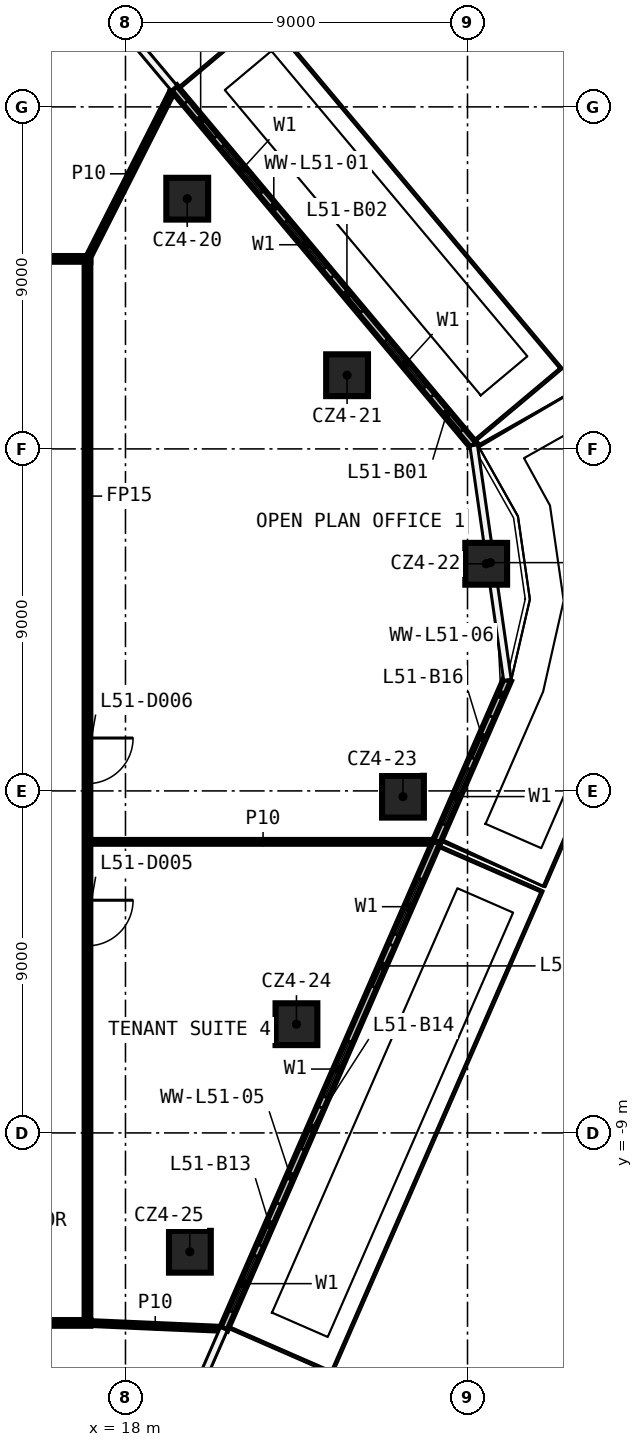
"""IFC4 building model, lengths in metres.
Left out: names, types, materials, properties, quantities, classifications, styles, units other than length and angle.
Written with IfcOpenShell. Run it as: python <this file> out.ifc"""

import sys

from ifc_helpers import new_model, si_unit, direction, frame, frame_2d, origin, origin_2d, place, context, subcontext, project, spatial, rectangle, extrude, element, fill, save


model = new_model("IFC4")
c1 = context("Model", 3, precision=1e-05, world=origin(), true_north=direction((0.0, 1.0)))
c2 = subcontext(c1, "Body", "Model", "MODEL_VIEW")
j1 = project(units=[si_unit("LENGTHUNIT", "METRE"), si_unit("PLANEANGLEUNIT", "RADIAN")], contexts=[c1])
p1 = place(None, origin())
s1 = spatial("IfcSite", under=j1, at=p1, CompositionType="ELEMENT")
p2 = place(p1, origin())
s2 = spatial("IfcBuilding", under=s1, at=p2, CompositionType="ELEMENT")
p3 = place(p2, frame((0.0, 0.0, 245.4)))
s3 = spatial("IfcBuildingStorey", under=s2, at=p3, CompositionType="ELEMENT", Elevation=245.4)
for number, where, z_axis, x_axis in (
    (1, (19.625, 15.584, 0.0), (0.0, 0.0, 1.0), (1.0, 0.0, 0.0)),
    (2, (23.831, 10.939, 0.0), (0.0, 0.0, 1.0), (1.0, 0.0, 0.0)),
    (3, (27.492, 5.977, 0.0), (0.0, 0.0, 1.0), (1.0, 0.0, 0.0)),
    (4, (25.302, -0.152, 0.0), (0.0, 0.0, 1.0), (1.0, 0.0, 0.0)),
    (5, (22.499, -6.139, 0.0), (0.0, 0.0, 1.0), (1.0, 0.0, 0.0)),
    (6, (19.695, -12.127, 0.0), (0.0, 0.0, 1.0), (1.0, 0.0, 0.0)),
):
    element("IfcColumn", number, at=place(p3, frame(where, z_axis=z_axis, x_axis=x_axis)), inside=s3, PredefinedType="COLUMN", context=c2, shape_type="SweptSolid", body=[
        extrude(rectangle(XDim=1.1, YDim=1.1, at=origin_2d()), origin(), (0.0, 0.0, 1.0), 3.82),
    ])
p4 = place(p3, frame((17.075, -14.0, 0.0), z_axis=(0.0, 0.0, 1.0), x_axis=(-1.0, 0.0, 0.0)))
e7 = element("IfcWall", 7, at=p4, inside=s3, PredefinedType="PARTITIONING", context=c2, shape_type="SweptSolid", body=[
    extrude(rectangle(XDim=26.15, YDim=0.15, at=frame_2d((13.075, 0.0))), origin(), (0.0, 0.0, 1.0), 3.82),
])
p5 = place(p4, frame((23.476, 0.0, 0.0)))
e8 = element("IfcOpeningElement", 8, at=p5, cuts=e7, PredefinedType="OPENING", context=c2, shape_type="SweptSolid", body=[
    extrude(rectangle(XDim=1.2, YDim=2.1, at=frame_2d((0.6, 1.05))), frame((0.0, 0.085, 0.0), z_axis=(0.0, -1.0, 0.0), x_axis=(1.0, 0.0, 0.0)), (0.0, 0.0, 1.0), 0.17),
])
p6 = place(p4, frame((19.452, 0.0, 0.0)))
e9 = element("IfcOpeningElement", 9, at=p6, cuts=e7, PredefinedType="OPENING", context=c2, shape_type="SweptSolid", body=[
    extrude(rectangle(XDim=1.2, YDim=2.1, at=frame_2d((0.6, 1.05))), frame((0.0, 0.085, 0.0), z_axis=(0.0, -1.0, 0.0), x_axis=(1.0, 0.0, 0.0)), (0.0, 0.0, 1.0), 0.17),
])
p7 = place(p4, frame((11.351, 0.0, 0.0)))
e10 = element("IfcOpeningElement", 10, at=p7, cuts=e7, PredefinedType="OPENING", context=c2, shape_type="SweptSolid", body=[
    extrude(rectangle(XDim=1.2, YDim=2.1, at=frame_2d((0.6, 1.05))), frame((0.0, 0.085, 0.0), z_axis=(0.0, -1.0, 0.0), x_axis=(1.0, 0.0, 0.0)), (0.0, 0.0, 1.0), 0.17),
])
p8 = place(p4, frame((3.125, 0.0, 0.0)))
e11 = element("IfcOpeningElement", 11, at=p8, cuts=e7, PredefinedType="OPENING", context=c2, shape_type="SweptSolid", body=[
    extrude(rectangle(XDim=1.2, YDim=2.1, at=frame_2d((0.6, 1.05))), frame((0.0, 0.085, 0.0), z_axis=(0.0, -1.0, 0.0), x_axis=(1.0, 0.0, 0.0)), (0.0, 0.0, 1.0), 0.17),
])
p9 = place(p3, frame((17.075, -1.341, 0.0), z_axis=(0.0, 0.0, 1.0), x_axis=(1.0, 0.0, 0.0)))
e12 = element("IfcWall", 12, at=p9, inside=s3, PredefinedType="PARTITIONING", context=c2, shape_type="SweptSolid", body=[
    extrude(rectangle(XDim=9.09, YDim=0.1, at=frame_2d((4.545, 0.0))), origin(), (0.0, 0.0, 1.0), 3.82),
])
p10 = place(p3, frame((-9.075, 14.0, 0.0), z_axis=(0.0, 0.0, 1.0), x_axis=(1.0, 0.0, 0.0)))
e13 = element("IfcWall", 13, at=p10, inside=s3, PredefinedType="PARTITIONING", context=c2, shape_type="SweptSolid", body=[
    extrude(rectangle(XDim=26.15, YDim=0.15, at=frame_2d((13.075, 0.0))), origin(), (0.0, 0.0, 1.0), 3.82),
])
p11 = place(p10, frame((20.934, 0.0, 0.0)))
e14 = element("IfcOpeningElement", 14, at=p11, cuts=e13, PredefinedType="OPENING", context=c2, shape_type="SweptSolid", body=[
    extrude(rectangle(XDim=1.2, YDim=2.1, at=frame_2d((0.6, 1.05))), frame((0.0, 0.085, 0.0), z_axis=(0.0, -1.0, 0.0), x_axis=(1.0, 0.0, 0.0)), (0.0, 0.0, 1.0), 0.17),
])
p12 = place(p10, frame((15.49, 0.0, 0.0)))
e15 = element("IfcOpeningElement", 15, at=p12, cuts=e13, PredefinedType="OPENING", context=c2, shape_type="SweptSolid", body=[
    extrude(rectangle(XDim=1.2, YDim=2.1, at=frame_2d((0.6, 1.05))), frame((0.0, 0.085, 0.0), z_axis=(0.0, -1.0, 0.0), x_axis=(1.0, 0.0, 0.0)), (0.0, 0.0, 1.0), 0.17),
])
p13 = place(p10, frame((7.396, 0.0, 0.0)))
e16 = element("IfcOpeningElement", 16, at=p13, cuts=e13, PredefinedType="OPENING", context=c2, shape_type="SweptSolid", body=[
    extrude(rectangle(XDim=1.2, YDim=2.1, at=frame_2d((0.6, 1.05))), frame((0.0, 0.085, 0.0), z_axis=(0.0, -1.0, 0.0), x_axis=(1.0, 0.0, 0.0)), (0.0, 0.0, 1.0), 0.17),
])
p14 = place(p10, frame((3.346, 0.0, 0.0)))
e17 = element("IfcOpeningElement", 17, at=p14, cuts=e13, PredefinedType="OPENING", context=c2, shape_type="SweptSolid", body=[
    extrude(rectangle(XDim=1.2, YDim=2.1, at=frame_2d((0.6, 1.05))), frame((0.0, 0.085, 0.0), z_axis=(0.0, -1.0, 0.0), x_axis=(1.0, 0.0, 0.0)), (0.0, 0.0, 1.0), 0.17),
])
p15 = place(p3, frame((17.0, 14.0, 0.0), z_axis=(0.0, 0.0, 1.0), x_axis=(0.451643796449, 0.892198341811, 0.0)))
e18 = element("IfcWall", 18, at=p15, inside=s3, PredefinedType="PARTITIONING", context=c2, shape_type="SweptSolid", body=[
    extrude(rectangle(XDim=5.02, YDim=0.1, at=frame_2d((2.51, 0.0))), origin(), (0.0, 0.0, 1.0), 3.82),
])
p16 = place(p3, frame((17.0, 13.925, 0.0), z_axis=(0.0, 0.0, 1.0), x_axis=(0.0, -1.0, 0.0)))
e19 = element("IfcWall", 19, at=p16, inside=s3, PredefinedType="PARTITIONING", context=c2, shape_type="SweptSolid", body=[
    extrude(rectangle(XDim=27.85, YDim=0.15, at=frame_2d((13.925, 0.0))), origin(), (0.0, 0.0, 1.0), 3.82),
])
p17 = place(p16, frame((16.802, 0.0, 0.0)))
e20 = element("IfcOpeningElement", 20, at=p17, cuts=e19, PredefinedType="OPENING", context=c2, shape_type="SweptSolid", body=[
    extrude(rectangle(XDim=1.2, YDim=2.1, at=frame_2d((0.6, 1.05))), frame((0.0, 0.085, 0.0), z_axis=(0.0, -1.0, 0.0), x_axis=(1.0, 0.0, 0.0)), (0.0, 0.0, 1.0), 0.17),
])
p18 = place(p16, frame((12.534, 0.0, 0.0)))
e21 = element("IfcOpeningElement", 21, at=p18, cuts=e19, PredefinedType="OPENING", context=c2, shape_type="SweptSolid", body=[
    extrude(rectangle(XDim=1.2, YDim=2.1, at=frame_2d((0.6, 1.05))), frame((0.0, 0.085, 0.0), z_axis=(0.0, -1.0, 0.0), x_axis=(1.0, 0.0, 0.0)), (0.0, 0.0, 1.0), 0.17),
])
p19 = place(p3, frame((17.0, -14.0, 0.0), z_axis=(0.0, 0.0, 1.0), x_axis=(0.99903279054, -0.043971393272, 0.0)))
e22 = element("IfcWall", 22, at=p19, inside=s3, PredefinedType="PARTITIONING", context=c2, shape_type="SweptSolid", body=[
    extrude(rectangle(XDim=3.57, YDim=0.1, at=frame_2d((1.785, 0.0))), origin(), (0.0, 0.0, 1.0), 3.82),
])
p20 = place(p3, frame((27.162, 9.091, 0.0), z_axis=(0.0, 0.0, 1.0), x_axis=(-0.642398297857, 0.766370946025, 0.0)))
e23 = element("IfcWall", 23, at=p20, inside=s3, PredefinedType="SOLIDWALL", context=c2, shape_type="SweptSolid", body=[
    extrude(rectangle(XDim=12.275, YDim=0.2, at=frame_2d((6.137, 0.0))), origin(), (0.0, 0.0, 1.0), 3.82),
])
p21 = place(p20, frame((2.0, 0.0, 0.6)))
e24 = element("IfcOpeningElement", 24, at=p21, cuts=e23, PredefinedType="OPENING", context=c2, shape_type="SweptSolid", body=[
    extrude(rectangle(XDim=1.6, YDim=2.4, at=frame_2d((0.8, 1.2))), frame((0.0, 0.11, 0.0), z_axis=(0.0, -1.0, 0.0), x_axis=(1.0, 0.0, 0.0)), (0.0, 0.0, 1.0), 0.22),
])
p22 = place(p20, frame((0.5, 0.0, 0.0)))
e25 = element("IfcOpeningElement", 25, at=p22, cuts=e23, PredefinedType="OPENING", context=c2, shape_type="SweptSolid", body=[
    extrude(rectangle(XDim=1.2, YDim=2.4, at=frame_2d((0.6, 1.2))), frame((0.0, 0.11, 0.0), z_axis=(0.0, -1.0, 0.0), x_axis=(1.0, 0.0, 0.0)), (0.0, 0.0, 1.0), 0.22),
])
p23 = place(p20, frame((6.092, 0.0, 0.6)))
e26 = element("IfcOpeningElement", 26, at=p23, cuts=e23, PredefinedType="OPENING", context=c2, shape_type="SweptSolid", body=[
    extrude(rectangle(XDim=1.6, YDim=2.4, at=frame_2d((0.8, 1.2))), frame((0.0, 0.11, 0.0), z_axis=(0.0, -1.0, 0.0), x_axis=(1.0, 0.0, 0.0)), (0.0, 0.0, 1.0), 0.22),
])
p24 = place(p20, frame((4.592, 0.0, 0.0)))
e27 = element("IfcOpeningElement", 27, at=p24, cuts=e23, PredefinedType="OPENING", context=c2, shape_type="SweptSolid", body=[
    extrude(rectangle(XDim=1.2, YDim=2.4, at=frame_2d((0.6, 1.2))), frame((0.0, 0.11, 0.0), z_axis=(0.0, -1.0, 0.0), x_axis=(1.0, 0.0, 0.0)), (0.0, 0.0, 1.0), 0.22),
])
p25 = place(p20, frame((8.683, 0.0, 0.6)))
e28 = element("IfcOpeningElement", 28, at=p25, cuts=e23, PredefinedType="OPENING", context=c2, shape_type="SweptSolid", body=[
    extrude(rectangle(XDim=1.6, YDim=2.4, at=frame_2d((0.8, 1.2))), frame((0.0, 0.11, 0.0), z_axis=(0.0, -1.0, 0.0), x_axis=(1.0, 0.0, 0.0)), (0.0, 0.0, 1.0), 0.22),
])
p26 = place(p20, frame((10.583, 0.0, 0.0)))
e29 = element("IfcOpeningElement", 29, at=p26, cuts=e23, PredefinedType="OPENING", context=c2, shape_type="SweptSolid", body=[
    extrude(rectangle(XDim=1.2, YDim=2.4, at=frame_2d((0.6, 1.2))), frame((0.0, 0.11, 0.0), z_axis=(0.0, -1.0, 0.0), x_axis=(1.0, 0.0, 0.0)), (0.0, 0.0, 1.0), 0.22),
])
p27 = place(p3, frame((20.588, -14.158, 0.0), z_axis=(0.0, 0.0, 1.0), x_axis=(0.400286749381, 0.916389937892, 0.0)))
e30 = element("IfcWall", 30, at=p27, inside=s3, PredefinedType="SOLIDWALL", context=c2, shape_type="SweptSolid", body=[
    extrude(rectangle(XDim=13.987, YDim=0.2, at=frame_2d((6.993, 0.0))), origin(), (0.0, 0.0, 1.0), 3.82),
])
p28 = place(p27, frame((0.5, 0.0, 0.6)))
e31 = element("IfcOpeningElement", 31, at=p28, cuts=e30, PredefinedType="OPENING", context=c2, shape_type="SweptSolid", body=[
    extrude(rectangle(XDim=1.6, YDim=2.4, at=frame_2d((0.8, 1.2))), frame((0.0, 0.11, 0.0), z_axis=(0.0, -1.0, 0.0), x_axis=(1.0, 0.0, 0.0)), (0.0, 0.0, 1.0), 0.22),
])
p29 = place(p27, frame((2.4, 0.0, 0.0)))
e32 = element("IfcOpeningElement", 32, at=p29, cuts=e30, PredefinedType="OPENING", context=c2, shape_type="SweptSolid", body=[
    extrude(rectangle(XDim=1.2, YDim=2.4, at=frame_2d((0.6, 1.2))), frame((0.0, 0.11, 0.0), z_axis=(0.0, -1.0, 0.0), x_axis=(1.0, 0.0, 0.0)), (0.0, 0.0, 1.0), 0.22),
])
p30 = place(p27, frame((6.662, 0.0, 0.6)))
e33 = element("IfcOpeningElement", 33, at=p30, cuts=e30, PredefinedType="OPENING", context=c2, shape_type="SweptSolid", body=[
    extrude(rectangle(XDim=1.6, YDim=2.4, at=frame_2d((0.8, 1.2))), frame((0.0, 0.11, 0.0), z_axis=(0.0, -1.0, 0.0), x_axis=(1.0, 0.0, 0.0)), (0.0, 0.0, 1.0), 0.22),
])
p31 = place(p27, frame((5.162, 0.0, 0.0)))
e34 = element("IfcOpeningElement", 34, at=p31, cuts=e30, PredefinedType="OPENING", context=c2, shape_type="SweptSolid", body=[
    extrude(rectangle(XDim=1.2, YDim=2.4, at=frame_2d((0.6, 1.2))), frame((0.0, 0.11, 0.0), z_axis=(0.0, -1.0, 0.0), x_axis=(1.0, 0.0, 0.0)), (0.0, 0.0, 1.0), 0.22),
])
p32 = place(p27, frame((11.324, 0.0, 0.6)))
e35 = element("IfcOpeningElement", 35, at=p32, cuts=e30, PredefinedType="OPENING", context=c2, shape_type="SweptSolid", body=[
    extrude(rectangle(XDim=1.6, YDim=2.4, at=frame_2d((0.8, 1.2))), frame((0.0, 0.11, 0.0), z_axis=(0.0, -1.0, 0.0), x_axis=(1.0, 0.0, 0.0)), (0.0, 0.0, 1.0), 0.22),
])
p33 = place(p27, frame((9.824, 0.0, 0.0)))
e36 = element("IfcOpeningElement", 36, at=p33, cuts=e30, PredefinedType="OPENING", context=c2, shape_type="SweptSolid", body=[
    extrude(rectangle(XDim=1.2, YDim=2.4, at=frame_2d((0.6, 1.2))), frame((0.0, 0.11, 0.0), z_axis=(0.0, -1.0, 0.0), x_axis=(1.0, 0.0, 0.0)), (0.0, 0.0, 1.0), 0.22),
])
p34 = place(p3, frame((26.187, -1.341, 0.0), z_axis=(0.0, 0.0, 1.0), x_axis=(0.400293036608, 0.916387191553, 0.0)))
e37 = element("IfcWall", 37, at=p34, inside=s3, PredefinedType="SOLIDWALL", context=c2, shape_type="SweptSolid", body=[
    extrude(rectangle(XDim=4.653, YDim=0.2, at=frame_2d((2.327, 0.0))), origin(), (0.0, 0.0, 1.0), 3.82),
])
p35 = place(p34, frame((0.5, 0.0, 0.6)))
e38 = element("IfcOpeningElement", 38, at=p35, cuts=e37, PredefinedType="OPENING", context=c2, shape_type="SweptSolid", body=[
    extrude(rectangle(XDim=1.6, YDim=2.4, at=frame_2d((0.8, 1.2))), frame((0.0, 0.11, 0.0), z_axis=(0.0, -1.0, 0.0), x_axis=(1.0, 0.0, 0.0)), (0.0, 0.0, 1.0), 0.22),
])
p36 = place(p34, frame((2.4, 0.0, 0.0)))
e39 = element("IfcOpeningElement", 39, at=p36, cuts=e37, PredefinedType="OPENING", context=c2, shape_type="SweptSolid", body=[
    extrude(rectangle(XDim=1.2, YDim=2.4, at=frame_2d((0.6, 1.2))), frame((0.0, 0.11, 0.0), z_axis=(0.0, -1.0, 0.0), x_axis=(1.0, 0.0, 0.0)), (0.0, 0.0, 1.0), 0.22),
])
p37 = place(p17, origin())
e40 = element("IfcDoor", 40, at=p37, inside=s3, OperationType="SINGLE_SWING_RIGHT", PredefinedType="DOOR", context=c2, shape_type="SweptSolid", body=[
    extrude(rectangle(XDim=1.2, YDim=2.1, at=frame_2d((0.6, 1.05))), frame((0.0, 0.025, 0.0), z_axis=(0.0, -1.0, 0.0), x_axis=(1.0, 0.0, 0.0)), (0.0, 0.0, 1.0), 0.05),
])
fill(e20, e40)
p38 = place(p18, origin())
e41 = element("IfcDoor", 41, at=p38, inside=s3, OperationType="SINGLE_SWING_LEFT", PredefinedType="DOOR", context=c2, shape_type="SweptSolid", body=[
    extrude(rectangle(XDim=1.2, YDim=2.1, at=frame_2d((0.6, 1.05))), frame((0.0, 0.025, 0.0), z_axis=(0.0, -1.0, 0.0), x_axis=(1.0, 0.0, 0.0)), (0.0, 0.0, 1.0), 0.05),
])
fill(e21, e41)
p39 = place(p21, origin())
e42 = element("IfcWindow", 42, at=p39, inside=s3, PartitioningType="SINGLE_PANEL", PredefinedType="WINDOW", context=c2, shape_type="SweptSolid", body=[
    extrude(rectangle(XDim=1.6, YDim=2.4, at=frame_2d((0.8, 1.2))), frame((0.0, 0.03, 0.0), z_axis=(0.0, -1.0, 0.0), x_axis=(1.0, 0.0, 0.0)), (0.0, 0.0, 1.0), 0.06),
])
fill(e24, e42)
p40 = place(p22, origin())
e43 = element("IfcDoor", 43, at=p40, inside=s3, OperationType="SLIDING_TO_LEFT", PredefinedType="DOOR", context=c2, shape_type="SweptSolid", body=[
    extrude(rectangle(XDim=1.2, YDim=2.4, at=frame_2d((0.6, 1.2))), frame((0.0, 0.025, 0.0), z_axis=(0.0, -1.0, 0.0), x_axis=(1.0, 0.0, 0.0)), (0.0, 0.0, 1.0), 0.05),
])
fill(e25, e43)
p41 = place(p23, origin())
e44 = element("IfcWindow", 44, at=p41, inside=s3, PartitioningType="SINGLE_PANEL", PredefinedType="WINDOW", context=c2, shape_type="SweptSolid", body=[
    extrude(rectangle(XDim=1.6, YDim=2.4, at=frame_2d((0.8, 1.2))), frame((0.0, 0.03, 0.0), z_axis=(0.0, -1.0, 0.0), x_axis=(1.0, 0.0, 0.0)), (0.0, 0.0, 1.0), 0.06),
])
fill(e26, e44)
p42 = place(p24, origin())
e45 = element("IfcDoor", 45, at=p42, inside=s3, OperationType="SLIDING_TO_LEFT", PredefinedType="DOOR", context=c2, shape_type="SweptSolid", body=[
    extrude(rectangle(XDim=1.2, YDim=2.4, at=frame_2d((0.6, 1.2))), frame((0.0, 0.025, 0.0), z_axis=(0.0, -1.0, 0.0), x_axis=(1.0, 0.0, 0.0)), (0.0, 0.0, 1.0), 0.05),
])
fill(e27, e45)
p43 = place(p25, origin())
e46 = element("IfcWindow", 46, at=p43, inside=s3, PartitioningType="SINGLE_PANEL", PredefinedType="WINDOW", context=c2, shape_type="SweptSolid", body=[
    extrude(rectangle(XDim=1.6, YDim=2.4, at=frame_2d((0.8, 1.2))), frame((0.0, 0.03, 0.0), z_axis=(0.0, -1.0, 0.0), x_axis=(1.0, 0.0, 0.0)), (0.0, 0.0, 1.0), 0.06),
])
fill(e28, e46)
p44 = place(p26, origin())
e47 = element("IfcDoor", 47, at=p44, inside=s3, OperationType="SLIDING_TO_LEFT", PredefinedType="DOOR", context=c2, shape_type="SweptSolid", body=[
    extrude(rectangle(XDim=1.2, YDim=2.4, at=frame_2d((0.6, 1.2))), frame((0.0, 0.025, 0.0), z_axis=(0.0, -1.0, 0.0), x_axis=(1.0, 0.0, 0.0)), (0.0, 0.0, 1.0), 0.05),
])
fill(e29, e47)
p45 = place(p28, origin())
e48 = element("IfcWindow", 48, at=p45, inside=s3, PartitioningType="SINGLE_PANEL", PredefinedType="WINDOW", context=c2, shape_type="SweptSolid", body=[
    extrude(rectangle(XDim=1.6, YDim=2.4, at=frame_2d((0.8, 1.2))), frame((0.0, 0.03, 0.0), z_axis=(0.0, -1.0, 0.0), x_axis=(1.0, 0.0, 0.0)), (0.0, 0.0, 1.0), 0.06),
])
fill(e31, e48)
p46 = place(p29, origin())
e49 = element("IfcDoor", 49, at=p46, inside=s3, OperationType="SLIDING_TO_LEFT", PredefinedType="DOOR", context=c2, shape_type="SweptSolid", body=[
    extrude(rectangle(XDim=1.2, YDim=2.4, at=frame_2d((0.6, 1.2))), frame((0.0, 0.025, 0.0), z_axis=(0.0, -1.0, 0.0), x_axis=(1.0, 0.0, 0.0)), (0.0, 0.0, 1.0), 0.05),
])
fill(e32, e49)
p47 = place(p30, origin())
e50 = element("IfcWindow", 50, at=p47, inside=s3, PartitioningType="SINGLE_PANEL", PredefinedType="WINDOW", context=c2, shape_type="SweptSolid", body=[
    extrude(rectangle(XDim=1.6, YDim=2.4, at=frame_2d((0.8, 1.2))), frame((0.0, 0.03, 0.0), z_axis=(0.0, -1.0, 0.0), x_axis=(1.0, 0.0, 0.0)), (0.0, 0.0, 1.0), 0.06),
])
fill(e33, e50)
p48 = place(p31, origin())
e51 = element("IfcDoor", 51, at=p48, inside=s3, OperationType="SLIDING_TO_LEFT", PredefinedType="DOOR", context=c2, shape_type="SweptSolid", body=[
    extrude(rectangle(XDim=1.2, YDim=2.4, at=frame_2d((0.6, 1.2))), frame((0.0, 0.025, 0.0), z_axis=(0.0, -1.0, 0.0), x_axis=(1.0, 0.0, 0.0)), (0.0, 0.0, 1.0), 0.05),
])
fill(e34, e51)
p49 = place(p32, origin())
e52 = element("IfcWindow", 52, at=p49, inside=s3, PartitioningType="SINGLE_PANEL", PredefinedType="WINDOW", context=c2, shape_type="SweptSolid", body=[
    extrude(rectangle(XDim=1.6, YDim=2.4, at=frame_2d((0.8, 1.2))), frame((0.0, 0.03, 0.0), z_axis=(0.0, -1.0, 0.0), x_axis=(1.0, 0.0, 0.0)), (0.0, 0.0, 1.0), 0.06),
])
fill(e35, e52)
p50 = place(p33, origin())
e53 = element("IfcDoor", 53, at=p50, inside=s3, OperationType="SLIDING_TO_LEFT", PredefinedType="DOOR", context=c2, shape_type="SweptSolid", body=[
    extrude(rectangle(XDim=1.2, YDim=2.4, at=frame_2d((0.6, 1.2))), frame((0.0, 0.025, 0.0), z_axis=(0.0, -1.0, 0.0), x_axis=(1.0, 0.0, 0.0)), (0.0, 0.0, 1.0), 0.05),
])
fill(e36, e53)
p51 = place(p35, origin())
e54 = element("IfcWindow", 54, at=p51, inside=s3, PartitioningType="SINGLE_PANEL", PredefinedType="WINDOW", context=c2, shape_type="SweptSolid", body=[
    extrude(rectangle(XDim=1.6, YDim=2.4, at=frame_2d((0.8, 1.2))), frame((0.0, 0.03, 0.0), z_axis=(0.0, -1.0, 0.0), x_axis=(1.0, 0.0, 0.0)), (0.0, 0.0, 1.0), 0.06),
])
fill(e38, e54)
p52 = place(p36, origin())
e55 = element("IfcDoor", 55, at=p52, inside=s3, OperationType="SLIDING_TO_LEFT", PredefinedType="DOOR", context=c2, shape_type="SweptSolid", body=[
    extrude(rectangle(XDim=1.2, YDim=2.4, at=frame_2d((0.6, 1.2))), frame((0.0, 0.025, 0.0), z_axis=(0.0, -1.0, 0.0), x_axis=(1.0, 0.0, 0.0)), (0.0, 0.0, 1.0), 0.05),
])
fill(e39, e55)
save(model, sys.argv[1])
